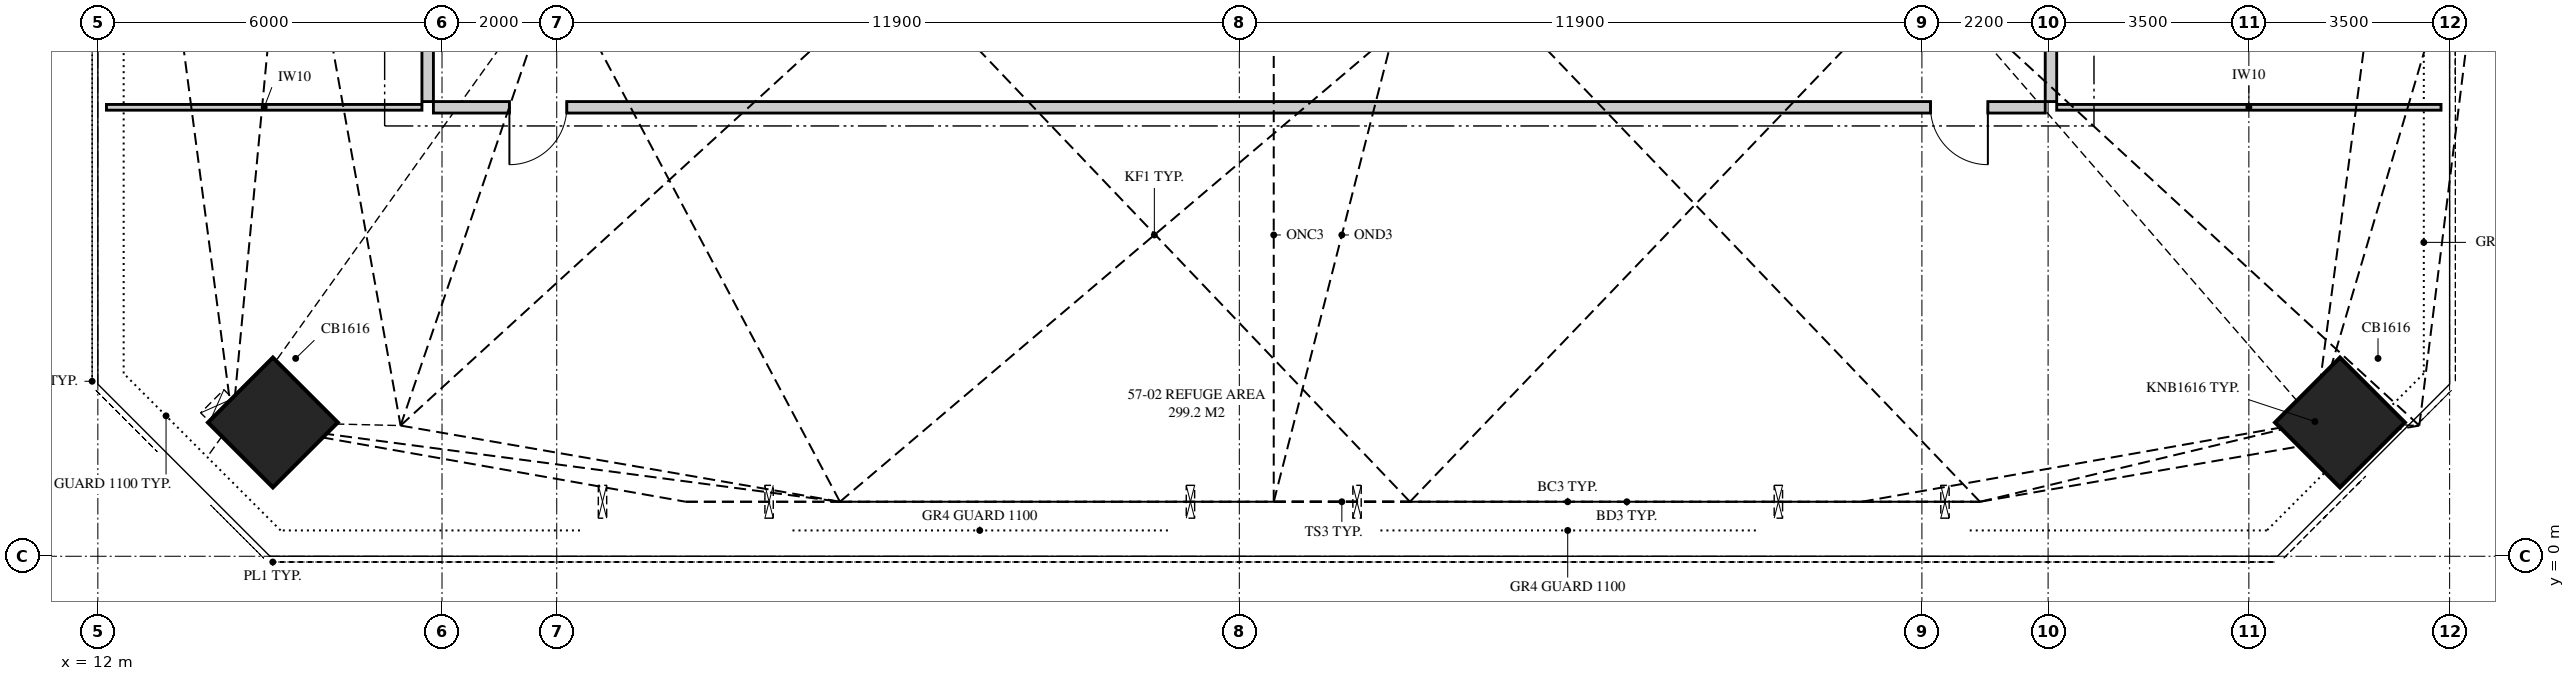
"""IFC4 building model, lengths in metres.
Left out: names, types, materials, properties, quantities, classifications, styles, units other than length and angle.
Written with IfcOpenShell. Run it as: python <this file> out.ifc"""

import sys

from ifc_helpers import new_model, si_unit, direction, frame, frame_2d, origin, origin_2d, place, context, subcontext, project, spatial, polyline, rectangle, hollow_rectangle, outline, extrude, element, fill, save


model = new_model("IFC4")
c1 = context("Model", 3, precision=1e-05, world=origin(), true_north=direction((0.0, 1.0)))
c2 = subcontext(c1, "Body", "Model", "MODEL_VIEW")
j1 = project(units=[si_unit("LENGTHUNIT", "METRE"), si_unit("PLANEANGLEUNIT", "RADIAN")], contexts=[c1])
p1 = place(None, origin())
s1 = spatial("IfcSite", under=j1, at=p1, CompositionType="ELEMENT")
p2 = place(p1, origin())
s2 = spatial("IfcBuilding", under=s1, at=p2, CompositionType="ELEMENT")
p3 = place(p2, frame((0.0, 0.0, 207.95)))
s3 = spatial("IfcBuildingStorey", under=s2, at=p3, CompositionType="ELEMENT", Elevation=207.95)
p4 = place(p3, frame((14.682, 2.34, 0.569), z_axis=(0.505477672138, -0.012174601821, 0.862753789931), x_axis=(0.566329451465, 0.759058068084, -0.321094692698)))
e1 = element("IfcColumn", 1, at=p4, inside=s3, PredefinedType="COLUMN", context=c2, shape_type="SweptSolid", body=[
    extrude(hollow_rectangle(XDim=1.6, YDim=1.6, WallThickness=0.125, at=origin_2d()), origin(), (0.0, 0.0, 1.0), 5.135),
])
p5 = place(p3, frame((50.793, 2.343, 0.387), z_axis=(0.342107137439, -0.013258544015, 0.939567409782), x_axis=(-0.641784433979, 0.727052744645, 0.24394066247)))
e2 = element("IfcColumn", 2, at=p5, inside=s3, PredefinedType="COLUMN", context=c2, shape_type="SweptSolid", body=[
    extrude(hollow_rectangle(XDim=1.6, YDim=1.6, WallThickness=0.125, at=origin_2d()), origin(), (0.0, 0.0, 1.0), 4.909),
])
p6 = place(p3, frame((17.85, 7.825, 0.0), z_axis=(0.0, 0.0, 1.0), x_axis=(1.0, 0.0, 0.0)))
e3 = element("IfcWall", 3, at=p6, inside=s3, PredefinedType="PARTITIONING", context=c2, shape_type="SweptSolid", body=[
    extrude(outline(polyline([(28.1, 1.2), (28.1, 4.72), (24.046, 4.72), (24.046, 4.141), (23.199, 4.141), (23.199, 4.72), (20.797, 4.72), (20.797, 4.141), (19.951, 4.141), (19.951, 4.72), (17.281, 4.72), (17.281, 4.245), (16.769, 4.245), (16.769, 4.72), (15.675, 4.72), (15.675, 4.141), (14.708, 4.141), (14.708, 4.72), (10.886, 4.72), (10.886, 4.141), (10.042, 4.141), (10.042, 4.72), (5.956, 4.72), (5.956, 4.141), (5.037, 4.141), (5.037, 4.72), (3.758, 4.72), (3.758, 4.141), (3.117, 4.141), (3.117, 4.72), (1.606, 4.72), (1.606, 4.141), (1.038, 4.141), (1.038, 4.72), (0.0, 4.72), (0.0, 1.2), (1.102, 1.2), (1.102, 0.0), (27.304, 0.0), (27.304, 1.2), (28.1, 1.2)]), holes=[polyline([(16.179, 3.43), (16.686, 3.496), (16.686, 3.004), (16.632, 2.889), (16.125, 2.824), (16.125, 3.316), (16.179, 3.43)])]), frame((0.0, 0.1, 0.0), z_axis=(0.0, -1.0, 0.0), x_axis=(1.0, 0.0, 0.0)), (0.0, 0.0, 1.0), 0.2),
])
p7 = place(p6, frame((1.325, 0.0, 0.0)))
e4 = element("IfcOpeningElement", 4, at=p7, cuts=e3, PredefinedType="OPENING", context=c2, shape_type="SweptSolid", body=[
    extrude(rectangle(XDim=1.0, YDim=2.1, at=frame_2d((0.5, 1.05))), frame((0.0, 0.11, 0.0), z_axis=(0.0, -1.0, 0.0), x_axis=(1.0, 0.0, 0.0)), (0.0, 0.0, 1.0), 0.22),
])
p8 = place(p6, frame((26.1, 0.0, 0.0)))
e5 = element("IfcOpeningElement", 5, at=p8, cuts=e3, PredefinedType="OPENING", context=c2, shape_type="SweptSolid", body=[
    extrude(rectangle(XDim=1.0, YDim=2.1, at=frame_2d((0.5, 1.05))), frame((0.0, 0.11, 0.0), z_axis=(0.0, -1.0, 0.0), x_axis=(1.0, 0.0, 0.0)), (0.0, 0.0, 1.0), 0.22),
])
p9 = place(p3, frame((17.75, 7.925, 0.0), z_axis=(0.0, 0.0, 1.0), x_axis=(0.0, 1.0, 0.0)))
e6 = element("IfcWall", 6, at=p9, inside=s3, PredefinedType="PARTITIONING", context=c2, shape_type="SweptSolid", body=[
    extrude(outline(polyline([(1.55, 4.72), (0.0, 4.72), (0.0, 1.2), (0.178, 1.2), (0.178, 0.0), (1.55, 0.0), (1.55, 4.72)])), frame((0.0, 0.1, 0.0), z_axis=(0.0, -1.0, 0.0), x_axis=(1.0, 0.0, 0.0)), (0.0, 0.0, 1.0), 0.2),
])
p10 = place(p3, frame((46.05, 7.925, 0.0), z_axis=(0.0, 0.0, 1.0), x_axis=(0.0, 1.0, 0.0)))
e7 = element("IfcWall", 7, at=p10, inside=s3, PredefinedType="PARTITIONING", context=c2, shape_type="SweptSolid", body=[
    extrude(outline(polyline([(1.55, 0.0), (1.55, 4.72), (0.669, 4.72), (0.669, 4.141), (0.0, 4.141), (0.0, 1.2), (0.609, 1.2), (0.609, 0.0), (1.55, 0.0)])), frame((0.0, 0.1, 0.0), z_axis=(0.0, -1.0, 0.0), x_axis=(1.0, 0.0, 0.0)), (0.0, 0.0, 1.0), 0.2),
])
p11 = place(p3, frame((12.15, 7.825, 0.0), z_axis=(0.0, 0.0, 1.0), x_axis=(1.0, 0.0, 0.0)))
e8 = element("IfcWall", 8, at=p11, inside=s3, PredefinedType="PARTITIONING", context=c2, shape_type="SweptSolid", body=[
    extrude(outline(polyline([(5.5, 1.2), (5.5, 4.72), (4.647, 4.72), (4.647, 3.72), (3.613, 3.72), (3.613, 4.72), (0.0, 4.72), (0.0, 0.0), (5.465, 0.0), (5.465, 1.2), (5.5, 1.2)]), holes=[polyline([(2.247, 1.24), (2.247, 2.245), (2.258, 2.301), (3.18, 2.341), (3.18, 1.336), (3.169, 1.281), (2.247, 1.24)])]), frame((0.0, 0.05, 0.0), z_axis=(0.0, -1.0, 0.0), x_axis=(1.0, 0.0, 0.0)), (0.0, 0.0, 1.0), 0.1),
])
p12 = place(p3, frame((46.15, 7.825, 0.0), z_axis=(0.0, 0.0, 1.0), x_axis=(1.0, 0.0, 0.0)))
e9 = element("IfcWall", 9, at=p12, inside=s3, PredefinedType="PARTITIONING", context=c2, shape_type="SweptSolid", body=[
    extrude(outline(polyline([(0.458, 0.0), (6.7, 0.0), (6.7, 1.203), (5.626, 1.203), (5.626, 2.204), (5.66, 2.257), (6.614, 2.379), (6.7, 2.379), (6.7, 3.72), (6.499, 3.72), (6.499, 4.72), (0.691, 4.72), (0.691, 4.141), (0.0, 4.141), (0.0, 1.2), (0.458, 1.2), (0.458, 0.0)])), frame((0.0, 0.05, 0.0), z_axis=(0.0, -1.0, 0.0), x_axis=(1.0, 0.0, 0.0)), (0.0, 0.0, 1.0), 0.1),
])
p13 = place(p7, frame((1.0, 0.0, 0.0), z_axis=(0.0, 0.0, 1.0), x_axis=(-1.0, 0.0, 0.0)))
e10 = element("IfcDoor", 10, at=p13, inside=s3, OperationType="SINGLE_SWING_RIGHT", PredefinedType="DOOR", context=c2, shape_type="SweptSolid", body=[
    extrude(rectangle(XDim=1.0, YDim=2.1, at=frame_2d((0.5, 1.05))), frame((0.0, 0.025, 0.0), z_axis=(0.0, -1.0, 0.0), x_axis=(1.0, 0.0, 0.0)), (0.0, 0.0, 1.0), 0.05),
])
fill(e4, e10)
p14 = place(p8, frame((1.0, 0.0, 0.0), z_axis=(0.0, 0.0, 1.0), x_axis=(-1.0, 0.0, 0.0)))
e11 = element("IfcDoor", 11, at=p14, inside=s3, OperationType="SINGLE_SWING_LEFT", PredefinedType="DOOR", context=c2, shape_type="SweptSolid", body=[
    extrude(rectangle(XDim=1.0, YDim=2.1, at=frame_2d((0.5, 1.05))), frame((0.0, 0.025, 0.0), z_axis=(0.0, -1.0, 0.0), x_axis=(1.0, 0.0, 0.0)), (0.0, 0.0, 1.0), 0.05),
])
fill(e5, e11)
save(model, sys.argv[1])
